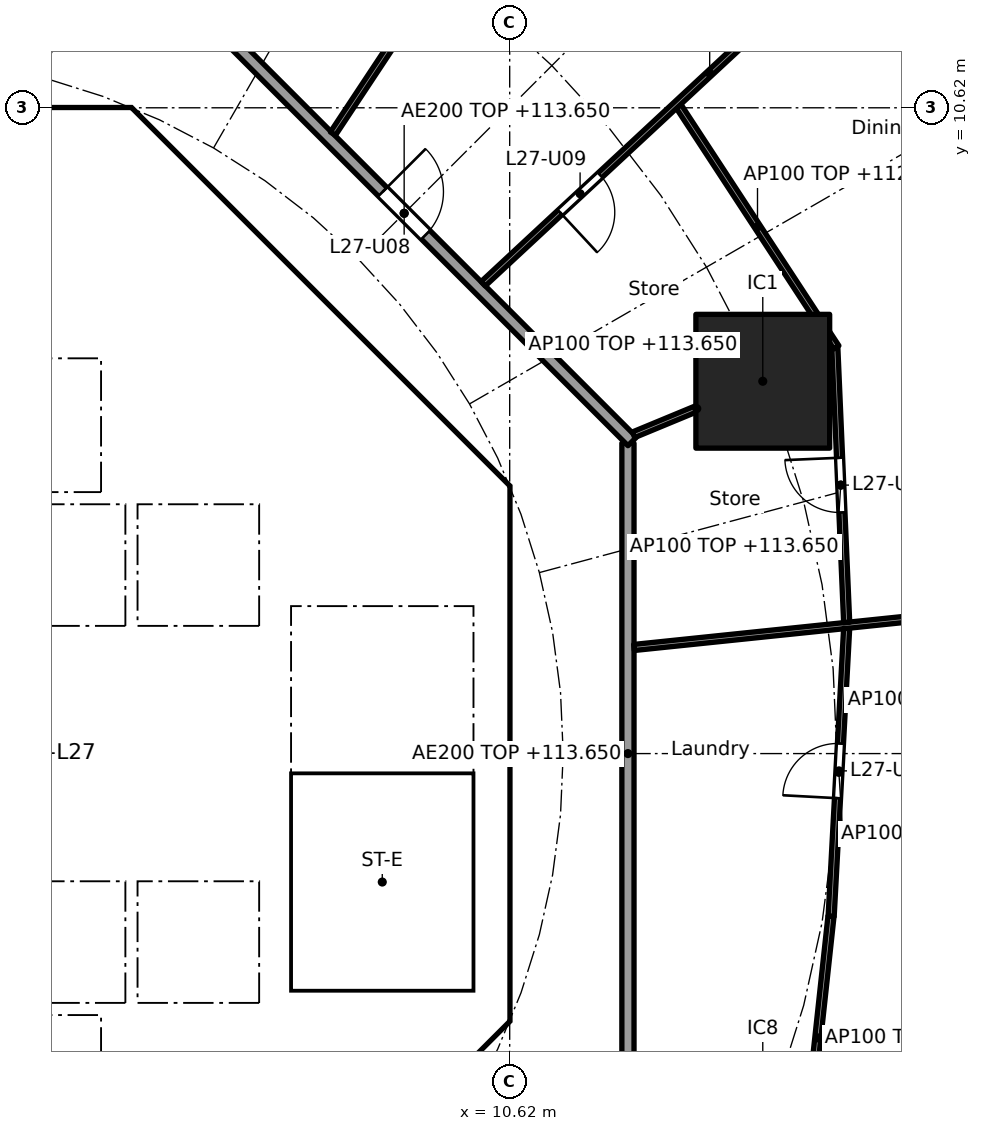
"""IFC4 building model, lengths in metres.
Left out: names, types, materials, properties, quantities, classifications, styles, units other than length and angle.
Written with IfcOpenShell. Run it as: python <this file> out.ifc"""

import sys

from ifc_helpers import new_model, si_unit, direction, frame, frame_2d, origin, origin_2d, place, context, subcontext, project, spatial, polyline, rectangle, outline, extrude, element, fill, save


model = new_model("IFC4")
c1 = context("Model", 3, precision=1e-05, world=origin(), true_north=direction((0.0, 1.0)))
c2 = subcontext(c1, "Body", "Model", "MODEL_VIEW")
j1 = project(units=[si_unit("LENGTHUNIT", "METRE"), si_unit("PLANEANGLEUNIT", "RADIAN")], contexts=[c1])
p1 = place(None, origin())
s1 = spatial("IfcSite", under=j1, at=p1, CompositionType="ELEMENT")
p2 = place(p1, origin())
s2 = spatial("IfcBuilding", under=s1, at=p2, CompositionType="ELEMENT")
p3 = place(p2, frame((0.0, 0.0, 110.3)))
s3 = spatial("IfcBuildingStorey", under=s2, at=p3, CompositionType="ELEMENT", Elevation=110.3)
p4 = place(p3, frame((14.782, 6.123, 0.0), z_axis=(0.0, 0.0, 1.0), x_axis=(1.0, 0.0, 0.0)))
e1 = element("IfcColumn", 1, at=p4, inside=s3, PredefinedType="COLUMN", context=c2, shape_type="SweptSolid", body=[
    extrude(rectangle(XDim=2.2, YDim=2.2, at=origin_2d()), origin(), (0.0, 0.0, 1.0), 3.7),
])
p5 = place(p3, frame((9.988, 4.613, 0.0), z_axis=(0.0, 0.0, 1.0), x_axis=(-0.707106781187, 0.707106781187, 0.0)))
e2 = element("IfcWall", 2, at=p5, inside=s3, PredefinedType="SHEAR", context=c2, shape_type="SweptSolid", body=[
    extrude(rectangle(XDim=7.602, YDim=0.6, at=frame_2d((3.801, 0.0))), origin(), (0.0, 0.0, 1.0), 3.35),
])
p6 = place(p5, frame((3.201, 0.0, 0.0)))
e3 = element("IfcOpeningElement", 3, at=p6, cuts=e2, PredefinedType="OPENING", context=c2, shape_type="SweptSolid", body=[
    extrude(rectangle(XDim=1.2, YDim=2.1, at=frame_2d((0.6, 1.05))), frame((0.0, 0.31, 0.0), z_axis=(0.0, -1.0, 0.0), x_axis=(1.0, 0.0, 0.0)), (0.0, 0.0, 1.0), 0.62),
])
p7 = place(p3, frame((4.613, -9.988, 0.0), z_axis=(0.0, 0.0, 1.0), x_axis=(0.707106781187, 0.707106781187, 0.0)))
e4 = element("IfcWall", 4, at=p7, inside=s3, PredefinedType="SHEAR", context=c2, shape_type="SweptSolid", body=[
    extrude(rectangle(XDim=7.602, YDim=0.6, at=frame_2d((3.801, 0.0))), origin(), (0.0, 0.0, 1.0), 3.35),
])
p8 = place(p7, frame((3.201, 0.0, 0.0)))
e5 = element("IfcOpeningElement", 5, at=p8, cuts=e4, PredefinedType="OPENING", context=c2, shape_type="SweptSolid", body=[
    extrude(rectangle(XDim=1.2, YDim=2.1, at=frame_2d((0.6, 1.05))), frame((0.0, 0.31, 0.0), z_axis=(0.0, -1.0, 0.0), x_axis=(1.0, 0.0, 0.0)), (0.0, 0.0, 1.0), 0.62),
])
p9 = place(p3, frame((4.0, 4.3, 0.0), z_axis=(0.0, 0.0, 1.0), x_axis=(0.0, 1.0, 0.0)))
e6 = element("IfcWall", 6, at=p9, inside=s3, PredefinedType="SOLIDWALL", context=c2, shape_type="SweptSolid", body=[
    extrude(rectangle(XDim=2.2, YDim=0.2, at=frame_2d((1.1, 0.0))), origin(), (0.0, 0.0, 1.0), 3.35),
])
p10 = place(p9, frame((0.55, 0.0, 0.0)))
e7 = element("IfcOpeningElement", 7, at=p10, cuts=e6, PredefinedType="OPENING", context=c2, shape_type="SweptSolid", body=[
    extrude(rectangle(XDim=1.1, YDim=2.1, at=frame_2d((0.55, 1.05))), frame((0.0, 0.11, 0.0), z_axis=(0.0, -1.0, 0.0), x_axis=(1.0, 0.0, 0.0)), (0.0, 0.0, 1.0), 0.22),
])
p11 = place(p3, frame((-6.7, 2.0, 0.0), z_axis=(0.0, 0.0, 1.0), x_axis=(1.0, 0.0, 0.0)))
e8 = element("IfcWall", 8, at=p11, inside=s3, PredefinedType="SOLIDWALL", context=c2, shape_type="SweptSolid", body=[
    extrude(rectangle(XDim=13.4, YDim=0.2, at=frame_2d((6.7, 0.0))), origin(), (0.0, 0.0, 1.0), 3.35),
])
p12 = place(p11, frame((0.65, 0.0, 0.0)))
e9 = element("IfcOpeningElement", 9, at=p12, cuts=e8, PredefinedType="OPENING", context=c2, shape_type="SweptSolid", body=[
    extrude(rectangle(XDim=1.1, YDim=2.1, at=frame_2d((0.55, 1.05))), frame((0.0, 0.11, 0.0), z_axis=(0.0, -1.0, 0.0), x_axis=(1.0, 0.0, 0.0)), (0.0, 0.0, 1.0), 0.22),
])
p13 = place(p11, frame((2.85, 0.0, 0.0)))
e10 = element("IfcOpeningElement", 10, at=p13, cuts=e8, PredefinedType="OPENING", context=c2, shape_type="SweptSolid", body=[
    extrude(rectangle(XDim=1.1, YDim=2.1, at=frame_2d((0.55, 1.05))), frame((0.0, 0.11, 0.0), z_axis=(0.0, -1.0, 0.0), x_axis=(1.0, 0.0, 0.0)), (0.0, 0.0, 1.0), 0.22),
])
p14 = place(p11, frame((5.05, 0.0, 0.0)))
e11 = element("IfcOpeningElement", 11, at=p14, cuts=e8, PredefinedType="OPENING", context=c2, shape_type="SweptSolid", body=[
    extrude(rectangle(XDim=1.1, YDim=2.1, at=frame_2d((0.55, 1.05))), frame((0.0, 0.11, 0.0), z_axis=(0.0, -1.0, 0.0), x_axis=(1.0, 0.0, 0.0)), (0.0, 0.0, 1.0), 0.22),
])
p15 = place(p3, frame((6.7, 4.0, 0.0), z_axis=(0.0, 0.0, 1.0), x_axis=(1.0, 0.0, 0.0)))
e12 = element("IfcWall", 12, at=p15, inside=s3, PredefinedType="SOLIDWALL", context=c2, shape_type="SweptSolid", body=[
    extrude(rectangle(XDim=3.325, YDim=0.2, at=frame_2d((1.662, 0.0))), origin(), (0.0, 0.0, 1.0), 3.35),
])
p16 = place(p15, frame((1.25, 0.0, 0.0)))
e13 = element("IfcOpeningElement", 13, at=p16, cuts=e12, PredefinedType="OPENING", context=c2, shape_type="SweptSolid", body=[
    extrude(rectangle(XDim=1.1, YDim=2.1, at=frame_2d((0.55, 1.05))), frame((0.0, 0.11, 0.0), z_axis=(0.0, -1.0, 0.0), x_axis=(1.0, 0.0, 0.0)), (0.0, 0.0, 1.0), 0.22),
])
p17 = place(p3, frame((4.0, 7.025, 0.0), z_axis=(0.0, 0.0, 1.0), x_axis=(0.0, 1.0, 0.0)))
e14 = element("IfcWall", 14, at=p17, inside=s3, PredefinedType="SOLIDWALL", context=c2, shape_type="SweptSolid", body=[
    extrude(rectangle(XDim=3.0, YDim=0.2, at=frame_2d((1.5, 0.0))), origin(), (0.0, 0.0, 1.0), 3.35),
])
p18 = place(p17, frame((0.925, 0.0, 0.0)))
e15 = element("IfcOpeningElement", 15, at=p18, cuts=e14, PredefinedType="OPENING", context=c2, shape_type="SweptSolid", body=[
    extrude(rectangle(XDim=1.1, YDim=2.1, at=frame_2d((0.55, 1.05))), frame((0.0, 0.11, 0.0), z_axis=(0.0, -1.0, 0.0), x_axis=(1.0, 0.0, 0.0)), (0.0, 0.0, 1.0), 0.22),
])
p19 = place(p3, frame((4.0, -6.5, 0.0), z_axis=(0.0, 0.0, 1.0), x_axis=(0.0, 1.0, 0.0)))
e16 = element("IfcWall", 16, at=p19, inside=s3, PredefinedType="SOLIDWALL", context=c2, shape_type="SweptSolid", body=[
    extrude(rectangle(XDim=2.2, YDim=0.2, at=frame_2d((1.1, 0.0))), origin(), (0.0, 0.0, 1.0), 3.35),
])
p20 = place(p19, frame((0.55, 0.0, 0.0)))
e17 = element("IfcOpeningElement", 17, at=p20, cuts=e16, PredefinedType="OPENING", context=c2, shape_type="SweptSolid", body=[
    extrude(rectangle(XDim=1.1, YDim=2.1, at=frame_2d((0.55, 1.05))), frame((0.0, 0.11, 0.0), z_axis=(0.0, -1.0, 0.0), x_axis=(1.0, 0.0, 0.0)), (0.0, 0.0, 1.0), 0.22),
])
p21 = place(p3, frame((-6.7, -2.0, 0.0), z_axis=(0.0, 0.0, 1.0), x_axis=(1.0, 0.0, 0.0)))
e18 = element("IfcWall", 18, at=p21, inside=s3, PredefinedType="SOLIDWALL", context=c2, shape_type="SweptSolid", body=[
    extrude(rectangle(XDim=13.4, YDim=0.2, at=frame_2d((6.7, 0.0))), origin(), (0.0, 0.0, 1.0), 3.35),
])
p22 = place(p21, frame((0.65, 0.0, 0.0)))
e19 = element("IfcOpeningElement", 19, at=p22, cuts=e18, PredefinedType="OPENING", context=c2, shape_type="SweptSolid", body=[
    extrude(rectangle(XDim=1.1, YDim=2.1, at=frame_2d((0.55, 1.05))), frame((0.0, 0.11, 0.0), z_axis=(0.0, -1.0, 0.0), x_axis=(1.0, 0.0, 0.0)), (0.0, 0.0, 1.0), 0.22),
])
p23 = place(p21, frame((2.85, 0.0, 0.0)))
e20 = element("IfcOpeningElement", 20, at=p23, cuts=e18, PredefinedType="OPENING", context=c2, shape_type="SweptSolid", body=[
    extrude(rectangle(XDim=1.1, YDim=2.1, at=frame_2d((0.55, 1.05))), frame((0.0, 0.11, 0.0), z_axis=(0.0, -1.0, 0.0), x_axis=(1.0, 0.0, 0.0)), (0.0, 0.0, 1.0), 0.22),
])
p24 = place(p3, origin())
e21 = element("IfcWall", 21, at=p24, inside=s3, PredefinedType="SHEAR", context=c2, shape_type="SweptSolid", body=[
    extrude(outline(polyline([(-4.152, 10.025), (-4.401, 9.776), (-4.825, 10.2), (-4.401, 10.625), (4.401, 10.625), (4.825, 10.2), (4.401, 9.776), (4.152, 10.025), (-4.152, 10.025)])), origin(), (0.0, 0.0, 1.0), 3.35),
])
p25 = place(p3, origin())
e22 = element("IfcWall", 22, at=p25, inside=s3, PredefinedType="SHEAR", context=c2, shape_type="SweptSolid", body=[
    extrude(outline(polyline([(9.776, -4.401), (10.025, -4.152), (10.025, -3.801), (10.025, 4.152), (9.776, 4.401), (10.2, 4.825), (10.625, 4.401), (10.625, -4.401), (10.2, -4.825), (9.776, -4.401)])), origin(), (0.0, 0.0, 1.0), 3.35),
])
p26 = place(p3, origin())
e23 = element("IfcWall", 23, at=p26, inside=s3, PredefinedType="SOLIDWALL", context=c2, shape_type="SweptSolid", body=[
    extrude(outline(polyline([(-6.7, -2.1), (-6.5, -2.1), (-6.5, -4.1), (-4.5, -4.1), (-4.5, -2.1), (-4.3, -2.1), (-4.3, -4.1), (-2.3, -4.1), (-2.3, -2.1), (-2.1, -2.1), (-2.1, -4.1), (-0.1, -4.1), (-0.1, -2.1), (0.1, -2.1), (0.1, -4.1), (2.1, -4.1), (2.1, -2.1), (2.3, -2.1), (2.3, -4.1), (4.3, -4.1), (4.3, -2.1), (4.5, -2.1), (4.5, -4.1), (6.5, -4.1), (6.5, -2.1), (6.7, -2.1), (6.7, -4.3), (-6.7, -4.3), (-6.7, -2.1)])), origin(), (0.0, 0.0, 1.0), 3.35),
])
p27 = place(p3, origin())
e24 = element("IfcWall", 24, at=p27, inside=s3, PredefinedType="SOLIDWALL", context=c2, shape_type="SweptSolid", body=[
    extrude(outline(polyline([(-6.5, 2.1), (-6.7, 2.1), (-6.7, 4.3), (6.7, 4.3), (6.7, 2.1), (6.5, 2.1), (6.5, 4.1), (4.5, 4.1), (4.5, 2.1), (4.3, 2.1), (4.3, 4.1), (2.3, 4.1), (2.3, 2.1), (2.1, 2.1), (2.1, 4.1), (0.1, 4.1), (0.1, 2.1), (-0.1, 2.1), (-0.1, 4.1), (-2.1, 4.1), (-2.1, 2.1), (-2.3, 2.1), (-2.3, 4.1), (-4.3, 4.1), (-4.3, 2.1), (-4.5, 2.1), (-4.5, 4.1), (-6.5, 4.1), (-6.5, 2.1)])), origin(), (0.0, 0.0, 1.0), 3.35),
])
p28 = place(p3, origin())
e25 = element("IfcWall", 25, at=p28, inside=s3, PredefinedType="SOLIDWALL", context=c2, shape_type="SweptSolid", body=[
    extrude(outline(polyline([(4.1, 6.5), (-4.1, 6.5), (-4.1, 7.025), (4.1, 7.025), (4.1, 6.5)])), origin(), (0.0, 0.0, 1.0), 3.35),
])
p29 = place(p3, origin())
e26 = element("IfcWall", 26, at=p29, inside=s3, PredefinedType="SOLIDWALL", context=c2, shape_type="SweptSolid", body=[
    extrude(outline(polyline([(7.025, -3.9), (6.7, -3.9), (6.7, 3.9), (7.025, 3.9), (7.025, -3.9)])), origin(), (0.0, 0.0, 1.0), 3.35),
])
p30 = place(p3, origin())
e27 = element("IfcWall", 27, at=p30, inside=s3, PredefinedType="SOLIDWALL", context=c2, shape_type="SweptSolid", body=[
    extrude(outline(polyline([(10.025, -4.1), (6.7, -4.1), (6.7, -3.9), (10.025, -3.9), (10.025, -4.1)])), origin(), (0.0, 0.0, 1.0), 3.35),
])
p31 = place(p3, frame((12.565, -5.104, 0.0), z_axis=(0.0, 0.0, 1.0), x_axis=(0.0, 1.0, 0.0)))
e28 = element("IfcWall", 28, at=p31, inside=s3, PredefinedType="PARTITIONING", context=c2, shape_type="SweptSolid", body=[
    extrude(rectangle(XDim=10.209, YDim=0.2, at=frame_2d((5.104, 0.0))), origin(), (0.0, 0.0, 1.0), 3.35),
])
p32 = place(p3, frame((12.635, 5.134, 0.0), z_axis=(0.0, 0.0, 1.0), x_axis=(-0.707106781187, 0.707106781187, 0.0)))
e29 = element("IfcWall", 29, at=p32, inside=s3, PredefinedType="PARTITIONING", context=c2, shape_type="SweptSolid", body=[
    extrude(rectangle(XDim=10.609, YDim=0.2, at=frame_2d((5.305, 0.0))), origin(), (0.0, 0.0, 1.0), 3.35),
])
p33 = place(p32, frame((4.804, 0.0, 0.0)))
e30 = element("IfcOpeningElement", 30, at=p33, cuts=e29, PredefinedType="OPENING", context=c2, shape_type="SweptSolid", body=[
    extrude(rectangle(XDim=1.0, YDim=2.1, at=frame_2d((0.5, 1.05))), frame((0.0, 0.11, 0.0), z_axis=(0.0, -1.0, 0.0), x_axis=(1.0, 0.0, 0.0)), (0.0, 0.0, 1.0), 0.22),
])
p34 = place(p3, frame((12.664, 1.745, 0.0), z_axis=(0.0, 0.0, 1.0), x_axis=(0.994662790212, 0.103179134358, 0.0)))
e31 = element("IfcWall", 31, at=p34, inside=s3, PredefinedType="PARTITIONING", context=c2, shape_type="SweptSolid", body=[
    extrude(rectangle(XDim=12.257, YDim=0.1, at=frame_2d((6.128, 0.0))), origin(), (0.0, 0.0, 1.0), 2.447),
])
p35 = place(p34, frame((5.414, 0.0, 0.0)))
e32 = element("IfcOpeningElement", 32, at=p35, cuts=e31, PredefinedType="OPENING", context=c2, shape_type="SweptSolid", body=[
    extrude(rectangle(XDim=0.9, YDim=2.1, at=frame_2d((0.45, 1.05))), frame((0.0, 0.06, 0.0), z_axis=(0.0, -1.0, 0.0), x_axis=(1.0, 0.0, 0.0)), (0.0, 0.0, 1.0), 0.12),
])
p36 = place(p3, frame((16.162, 2.158, 0.0), z_axis=(0.0, 0.0, 1.0), x_axis=(-0.043120653248, 0.999069872063, 0.0)))
e33 = element("IfcWall", 33, at=p36, inside=s3, PredefinedType="PARTITIONING", context=c2, shape_type="SweptSolid", body=[
    extrude(rectangle(XDim=4.518, YDim=0.1, at=frame_2d((2.259, 0.0))), origin(), (0.0, 0.0, 1.0), 3.35),
])
p37 = place(p36, frame((1.809, 0.0, 0.0)))
e34 = element("IfcOpeningElement", 34, at=p37, cuts=e33, PredefinedType="OPENING", context=c2, shape_type="SweptSolid", body=[
    extrude(rectangle(XDim=0.9, YDim=2.1, at=frame_2d((0.45, 1.05))), frame((0.0, 0.06, 0.0), z_axis=(0.0, -1.0, 0.0), x_axis=(1.0, 0.0, 0.0)), (0.0, 0.0, 1.0), 0.12),
])
p38 = place(p3, frame((16.161, 2.058, 0.0), z_axis=(0.0, 0.0, 1.0), x_axis=(-0.053696394729, -0.998557307916, 0.0)))
e35 = element("IfcWall", 35, at=p38, inside=s3, PredefinedType="PARTITIONING", context=c2, shape_type="SweptSolid", body=[
    extrude(rectangle(XDim=4.742, YDim=0.1, at=frame_2d((2.371, 0.0))), origin(), (0.0, 0.0, 1.0), 2.597),
])
p39 = place(p38, frame((1.896, 0.0, 0.0)))
e36 = element("IfcOpeningElement", 36, at=p39, cuts=e35, PredefinedType="OPENING", context=c2, shape_type="SweptSolid", body=[
    extrude(rectangle(XDim=0.9, YDim=2.1, at=frame_2d((0.45, 1.05))), frame((0.0, 0.06, 0.0), z_axis=(0.0, -1.0, 0.0), x_axis=(1.0, 0.0, 0.0)), (0.0, 0.0, 1.0), 0.12),
])
p40 = place(p3, frame((12.657, 5.243, 0.0), z_axis=(0.0, 0.0, 1.0), x_axis=(0.923864733477, 0.382719158442, 0.0)))
e37 = element("IfcWall", 37, at=p40, inside=s3, PredefinedType="PARTITIONING", context=c2, shape_type="SweptSolid", body=[
    extrude(rectangle(XDim=2.25, YDim=0.1, at=frame_2d((1.125, 0.0))), origin(), (0.0, 0.0, 1.0), 3.35),
])
p41 = place(p3, frame((15.992, 6.68, 0.0), z_axis=(0.0, 0.0, 1.0), x_axis=(-0.547472878942, 0.836823426311, 0.0)))
e38 = element("IfcWall", 38, at=p41, inside=s3, PredefinedType="PARTITIONING", context=c2, shape_type="SweptSolid", body=[
    extrude(rectangle(XDim=4.738, YDim=0.1, at=frame_2d((2.369, 0.0))), origin(), (0.0, 0.0, 1.0), 2.597),
])
p42 = place(p3, frame((10.185, 7.726, 0.0), z_axis=(0.0, 0.0, 1.0), x_axis=(0.732598472978, 0.680661059112, 0.0)))
e39 = element("IfcWall", 39, at=p42, inside=s3, PredefinedType="PARTITIONING", context=c2, shape_type="SweptSolid", body=[
    extrude(rectangle(XDim=10.167, YDim=0.1, at=frame_2d((5.084, 0.0))), origin(), (0.0, 0.0, 1.0), 2.447),
])
p43 = place(p42, frame((1.725, 0.0, 0.0)))
e40 = element("IfcOpeningElement", 40, at=p43, cuts=e39, PredefinedType="OPENING", context=c2, shape_type="SweptSolid", body=[
    extrude(rectangle(XDim=0.9, YDim=2.1, at=frame_2d((0.45, 1.05))), frame((0.0, 0.06, 0.0), z_axis=(0.0, -1.0, 0.0), x_axis=(1.0, 0.0, 0.0)), (0.0, 0.0, 1.0), 0.12),
])
p44 = place(p42, frame((6.784, 0.0, 0.0)))
e41 = element("IfcOpeningElement", 41, at=p44, cuts=e39, PredefinedType="OPENING", context=c2, shape_type="SweptSolid", body=[
    extrude(rectangle(XDim=0.9, YDim=2.1, at=frame_2d((0.45, 1.05))), frame((0.0, 0.06, 0.0), z_axis=(0.0, -1.0, 0.0), x_axis=(1.0, 0.0, 0.0)), (0.0, 0.0, 1.0), 0.12),
])
p45 = place(p3, frame((7.713, 10.195, 0.0), z_axis=(0.0, 0.0, 1.0), x_axis=(0.552111071171, 0.833770571015, 0.0)))
e42 = element("IfcWall", 42, at=p45, inside=s3, PredefinedType="PARTITIONING", context=c2, shape_type="SweptSolid", body=[
    extrude(rectangle(XDim=17.208, YDim=0.1, at=frame_2d((8.604, 0.0))), origin(), (0.0, 0.0, 1.0), 2.447),
])
p46 = place(p45, frame((1.976, 0.0, 0.0)))
e43 = element("IfcOpeningElement", 43, at=p46, cuts=e42, PredefinedType="OPENING", context=c2, shape_type="SweptSolid", body=[
    extrude(rectangle(XDim=0.9, YDim=2.1, at=frame_2d((0.45, 1.05))), frame((0.0, 0.06, 0.0), z_axis=(0.0, -1.0, 0.0), x_axis=(1.0, 0.0, 0.0)), (0.0, 0.0, 1.0), 0.12),
])
p47 = place(p45, frame((7.611, 0.0, 0.0)))
e44 = element("IfcOpeningElement", 44, at=p47, cuts=e42, PredefinedType="OPENING", context=c2, shape_type="SweptSolid", body=[
    extrude(rectangle(XDim=0.9, YDim=2.1, at=frame_2d((0.45, 1.05))), frame((0.0, 0.06, 0.0), z_axis=(0.0, -1.0, 0.0), x_axis=(1.0, 0.0, 0.0)), (0.0, 0.0, 1.0), 0.12),
])
p48 = place(p45, frame((13.79, 0.0, 0.0)))
e45 = element("IfcOpeningElement", 45, at=p48, cuts=e42, PredefinedType="OPENING", context=c2, shape_type="SweptSolid", body=[
    extrude(rectangle(XDim=0.9, YDim=2.1, at=frame_2d((0.45, 1.05))), frame((0.0, 0.06, 0.0), z_axis=(0.0, -1.0, 0.0), x_axis=(1.0, 0.0, 0.0)), (0.0, 0.0, 1.0), 0.12),
])
p49 = place(p3, frame((15.471, -6.675, 0.0), z_axis=(0.0, 0.0, 1.0), x_axis=(0.107572661837, 0.994197225114, 0.0)))
e46 = element("IfcWall", 46, at=p49, inside=s3, PredefinedType="PARTITIONING", context=c2, shape_type="SweptSolid", body=[
    extrude(rectangle(XDim=4.022, YDim=0.1, at=frame_2d((2.011, 0.0))), origin(), (0.0, 0.0, 1.0), 2.597),
])
p50 = place(p10, origin())
e47 = element("IfcDoor", 47, at=p50, inside=s3, OperationType="DOUBLE_DOOR_SLIDING", PredefinedType="DOOR", context=c2, shape_type="SweptSolid", body=[
    extrude(rectangle(XDim=1.1, YDim=2.1, at=frame_2d((0.55, 1.05))), frame((0.0, 0.025, 0.0), z_axis=(0.0, -1.0, 0.0), x_axis=(1.0, 0.0, 0.0)), (0.0, 0.0, 1.0), 0.05),
])
fill(e7, e47)
p51 = place(p20, origin())
e48 = element("IfcDoor", 48, at=p51, inside=s3, OperationType="DOUBLE_DOOR_SLIDING", PredefinedType="DOOR", context=c2, shape_type="SweptSolid", body=[
    extrude(rectangle(XDim=1.1, YDim=2.1, at=frame_2d((0.55, 1.05))), frame((0.0, 0.025, 0.0), z_axis=(0.0, -1.0, 0.0), x_axis=(1.0, 0.0, 0.0)), (0.0, 0.0, 1.0), 0.05),
])
fill(e17, e48)
p52 = place(p16, frame((1.1, 0.0, 0.0), x_axis=(-1.0, 0.0, 0.0)))
e49 = element("IfcDoor", 49, at=p52, inside=s3, OperationType="SINGLE_SWING_LEFT", PredefinedType="DOOR", context=c2, shape_type="SweptSolid", body=[
    extrude(rectangle(XDim=1.1, YDim=2.1, at=frame_2d((0.55, 1.05))), frame((0.0, 0.025, 0.0), z_axis=(0.0, -1.0, 0.0), x_axis=(1.0, 0.0, 0.0)), (0.0, 0.0, 1.0), 0.05),
])
fill(e13, e49)
p53 = place(p18, origin())
e50 = element("IfcDoor", 50, at=p53, inside=s3, OperationType="SINGLE_SWING_RIGHT", PredefinedType="DOOR", context=c2, shape_type="SweptSolid", body=[
    extrude(rectangle(XDim=1.1, YDim=2.1, at=frame_2d((0.55, 1.05))), frame((0.0, 0.025, 0.0), z_axis=(0.0, -1.0, 0.0), x_axis=(1.0, 0.0, 0.0)), (0.0, 0.0, 1.0), 0.05),
])
fill(e15, e50)
p54 = place(p6, origin())
e51 = element("IfcDoor", 51, at=p54, inside=s3, OperationType="SINGLE_SWING_RIGHT", PredefinedType="DOOR", context=c2, shape_type="SweptSolid", body=[
    extrude(rectangle(XDim=1.2, YDim=2.1, at=frame_2d((0.6, 1.05))), frame((0.0, 0.025, 0.0), z_axis=(0.0, -1.0, 0.0), x_axis=(1.0, 0.0, 0.0)), (0.0, 0.0, 1.0), 0.05),
])
fill(e3, e51)
p55 = place(p33, frame((1.0, 0.0, 0.0), x_axis=(-1.0, 0.0, 0.0)))
e52 = element("IfcDoor", 52, at=p55, inside=s3, OperationType="SINGLE_SWING_LEFT", PredefinedType="DOOR", context=c2, shape_type="SweptSolid", body=[
    extrude(rectangle(XDim=1.0, YDim=2.1, at=frame_2d((0.5, 1.05))), frame((0.0, 0.025, 0.0), z_axis=(0.0, -1.0, 0.0), x_axis=(1.0, 0.0, 0.0)), (0.0, 0.0, 1.0), 0.05),
])
fill(e30, e52)
p56 = place(p43, frame((0.9, 0.0, 0.0), x_axis=(-1.0, 0.0, 0.0)))
e53 = element("IfcDoor", 53, at=p56, inside=s3, OperationType="SINGLE_SWING_RIGHT", PredefinedType="DOOR", context=c2, shape_type="SweptSolid", body=[
    extrude(rectangle(XDim=0.9, YDim=2.1, at=frame_2d((0.45, 1.05))), frame((0.0, 0.025, 0.0), z_axis=(0.0, -1.0, 0.0), x_axis=(1.0, 0.0, 0.0)), (0.0, 0.0, 1.0), 0.05),
])
fill(e40, e53)
p57 = place(p37, origin())
e54 = element("IfcDoor", 54, at=p57, inside=s3, OperationType="SINGLE_SWING_RIGHT", PredefinedType="DOOR", context=c2, shape_type="SweptSolid", body=[
    extrude(rectangle(XDim=0.9, YDim=2.1, at=frame_2d((0.45, 1.05))), frame((0.0, 0.025, 0.0), z_axis=(0.0, -1.0, 0.0), x_axis=(1.0, 0.0, 0.0)), (0.0, 0.0, 1.0), 0.05),
])
fill(e34, e54)
p58 = place(p39, frame((0.9, 0.0, 0.0), x_axis=(-1.0, 0.0, 0.0)))
e55 = element("IfcDoor", 55, at=p58, inside=s3, OperationType="SINGLE_SWING_LEFT", PredefinedType="DOOR", context=c2, shape_type="SweptSolid", body=[
    extrude(rectangle(XDim=0.9, YDim=2.1, at=frame_2d((0.45, 1.05))), frame((0.0, 0.025, 0.0), z_axis=(0.0, -1.0, 0.0), x_axis=(1.0, 0.0, 0.0)), (0.0, 0.0, 1.0), 0.05),
])
fill(e36, e55)
save(model, sys.argv[1])
